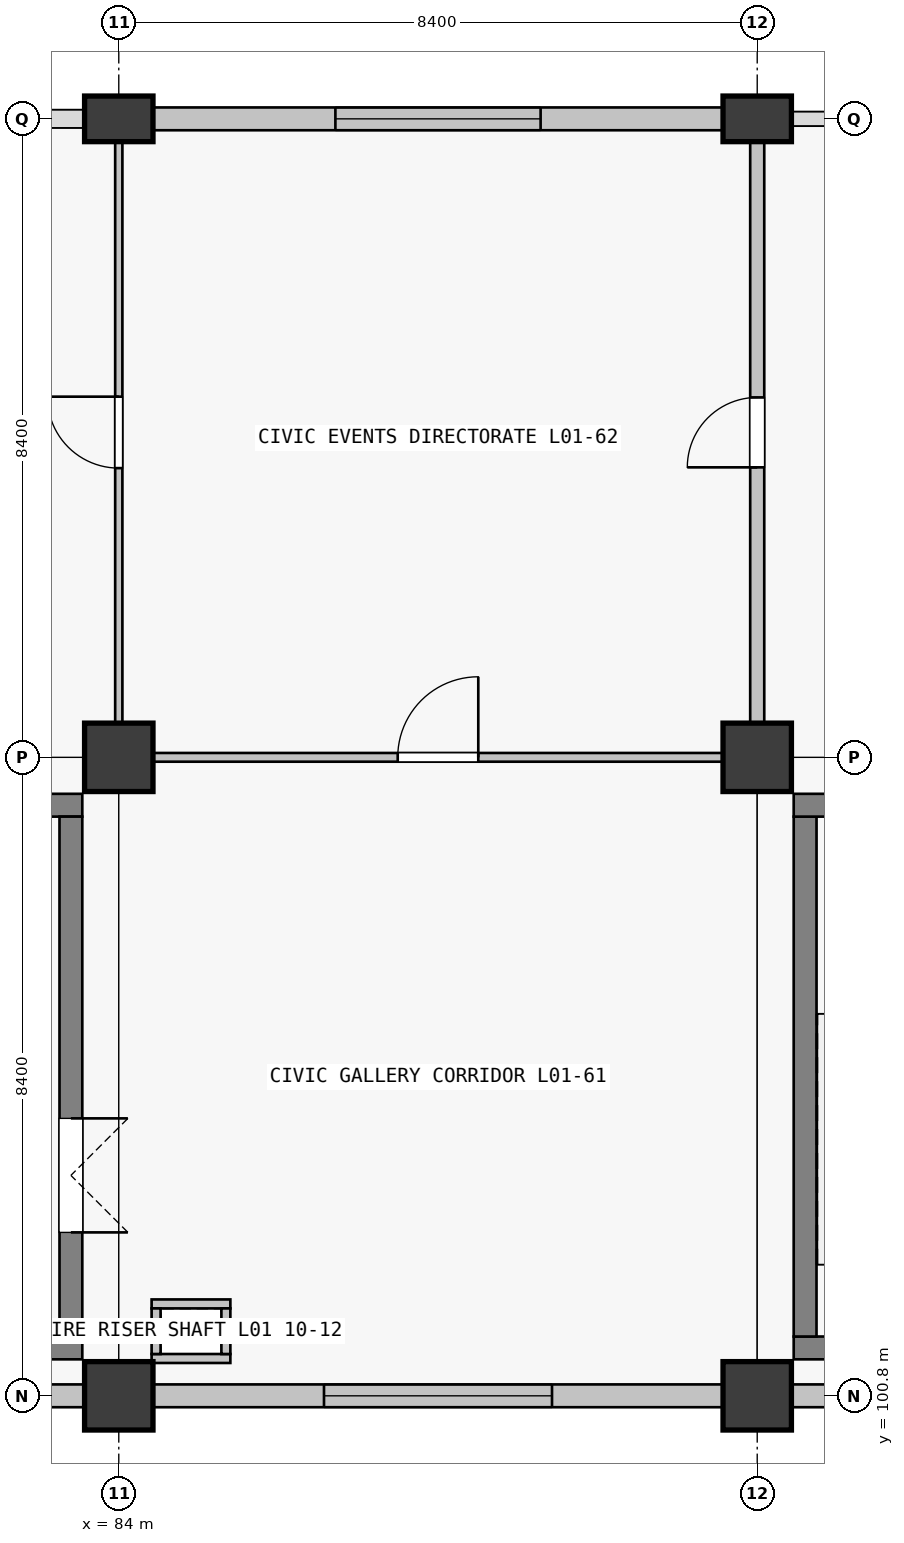
"""IFC4 building model, lengths in metres.
Left out: names, types, materials, properties, quantities, classifications, styles, units other than length and angle.
Written with IfcOpenShell. Run it as: python <this file> out.ifc"""

import sys

from ifc_helpers import new_model, si_unit, direction, frame, frame_2d, origin, origin_2d, place, context, subcontext, project, spatial, rectangle, extrude, element, fill, save


model = new_model("IFC4")
c1 = context("Model", 3, precision=1e-05, world=origin(), true_north=direction((0.0, 1.0)))
c2 = subcontext(c1, "Body", "Model", "MODEL_VIEW")
j1 = project(units=[si_unit("LENGTHUNIT", "METRE"), si_unit("PLANEANGLEUNIT", "RADIAN")], contexts=[c1])
p1 = place(None, origin())
s1 = spatial("IfcSite", under=j1, at=p1, CompositionType="ELEMENT")
p2 = place(p1, origin())
s2 = spatial("IfcBuilding", under=s1, at=p2, CompositionType="ELEMENT")
p3 = place(p2, frame((0.0, 0.0, 5.76)))
s3 = spatial("IfcBuildingStorey", under=s2, at=p3, CompositionType="ELEMENT", Elevation=5.76)
for number, where, z_axis, x_axis in (
    (1, (84.0, 100.8, 0.0), (0.0, 0.0, 1.0), (1.0, 0.0, 0.0)),
    (2, (84.0, 109.2, 0.0), (0.0, 0.0, 1.0), (1.0, 0.0, 0.0)),
):
    element("IfcColumn", number, at=place(p3, frame(where, z_axis=z_axis, x_axis=x_axis)), inside=s3, PredefinedType="COLUMN", context=c2, shape_type="SweptSolid", body=[
        extrude(rectangle(XDim=0.9, YDim=0.9, at=origin_2d()), origin(), (0.0, 0.0, 1.0), 4.5),
    ])
p4 = place(p3, frame((84.0, 117.6, 0.0), z_axis=(0.0, 0.0, 1.0), x_axis=(1.0, 0.0, 0.0)))
e3 = element("IfcColumn", 3, at=p4, inside=s3, PredefinedType="COLUMN", context=c2, shape_type="SweptSolid", body=[
    extrude(rectangle(XDim=0.9, YDim=0.6, at=origin_2d()), origin(), (0.0, 0.0, 1.0), 4.5),
])
for number, where, z_axis, x_axis in (
    (4, (92.4, 100.8, 0.0), (0.0, 0.0, 1.0), (1.0, 0.0, 0.0)),
    (5, (92.4, 109.2, 0.0), (0.0, 0.0, 1.0), (1.0, 0.0, 0.0)),
):
    element("IfcColumn", number, at=place(p3, frame(where, z_axis=z_axis, x_axis=x_axis)), inside=s3, PredefinedType="COLUMN", context=c2, shape_type="SweptSolid", body=[
        extrude(rectangle(XDim=0.9, YDim=0.9, at=origin_2d()), origin(), (0.0, 0.0, 1.0), 4.5),
    ])
p5 = place(p3, frame((92.4, 117.6, 0.0), z_axis=(0.0, 0.0, 1.0), x_axis=(1.0, 0.0, 0.0)))
e6 = element("IfcColumn", 6, at=p5, inside=s3, PredefinedType="COLUMN", context=c2, shape_type="SweptSolid", body=[
    extrude(rectangle(XDim=0.9, YDim=0.6, at=origin_2d()), origin(), (0.0, 0.0, 1.0), 4.5),
])
p6 = place(p3, frame((83.549, 100.8, 0.0), z_axis=(0.0, 0.0, 1.0), x_axis=(-1.0, 0.0, 0.0)))
e7 = element("IfcWall", 7, at=p6, inside=s3, PredefinedType="SOLIDWALL", context=c2, shape_type="SweptSolid", body=[
    extrude(rectangle(XDim=7.498, YDim=0.3, at=frame_2d((3.749, 0.0))), origin(), (0.0, 0.0, 1.0), 3.4),
])
p7 = place(p3, frame((91.949, 100.8, 0.0), z_axis=(0.0, 0.0, 1.0), x_axis=(-1.0, 0.0, 0.0)))
e8 = element("IfcWall", 8, at=p7, inside=s3, PredefinedType="SOLIDWALL", context=c2, shape_type="SweptSolid", body=[
    extrude(rectangle(XDim=7.498, YDim=0.3, at=frame_2d((3.749, 0.0))), origin(), (0.0, 0.0, 1.0), 3.4),
])
p8 = place(p7, frame((2.249, 0.0, 0.9)))
e9 = element("IfcOpeningElement", 9, at=p8, cuts=e8, PredefinedType="OPENING", context=c2, shape_type="SweptSolid", body=[
    extrude(rectangle(XDim=3.0, YDim=1.2, at=frame_2d((1.5, 0.6))), frame((0.0, 0.15, 0.0), z_axis=(0.0, -1.0, 0.0), x_axis=(1.0, 0.0, 0.0)), (0.0, 0.0, 1.0), 0.3),
])
p9 = place(p3, frame((84.451, 117.6, 0.0), z_axis=(0.0, 0.0, 1.0), x_axis=(1.0, 0.0, 0.0)))
e10 = element("IfcWall", 10, at=p9, inside=s3, PredefinedType="SOLIDWALL", context=c2, shape_type="SweptSolid", body=[
    extrude(rectangle(XDim=7.498, YDim=0.3, at=frame_2d((3.749, 0.0))), origin(), (0.0, 0.0, 1.0), 3.4),
])
p10 = place(p9, frame((2.399, 0.0, 0.9)))
e11 = element("IfcOpeningElement", 11, at=p10, cuts=e10, PredefinedType="OPENING", context=c2, shape_type="SweptSolid", body=[
    extrude(rectangle(XDim=2.7, YDim=1.2, at=frame_2d((1.35, 0.6))), frame((0.0, 0.15, 0.0), z_axis=(0.0, -1.0, 0.0), x_axis=(1.0, 0.0, 0.0)), (0.0, 0.0, 1.0), 0.3),
])
p11 = place(p3, frame((100.349, 100.8, 0.0), z_axis=(0.0, 0.0, 1.0), x_axis=(-1.0, 0.0, 0.0)))
e12 = element("IfcWall", 12, at=p11, inside=s3, PredefinedType="SOLIDWALL", context=c2, shape_type="SweptSolid", body=[
    extrude(rectangle(XDim=7.498, YDim=0.3, at=frame_2d((3.749, 0.0))), origin(), (0.0, 0.0, 1.0), 3.4),
])
for number, where, z_axis, x_axis in (
    (13, (83.52, 101.43, 0.0), (0.0, 0.0, 1.0), (-1.0, 0.0, 0.0)),
    (14, (76.08, 108.57, 0.0), (0.0, 0.0, 1.0), (1.0, 0.0, 0.0)),
):
    element("IfcWall", number, at=place(p3, frame(where, z_axis=z_axis, x_axis=x_axis)), inside=s3, PredefinedType="SHEAR", context=c2, shape_type="SweptSolid", body=[
        extrude(rectangle(XDim=7.44, YDim=0.3, at=frame_2d((3.72, 0.0))), origin(), (0.0, 0.0, 1.0), 4.5),
    ])
p12 = place(p3, frame((83.37, 108.42, 0.0), z_axis=(0.0, 0.0, 1.0), x_axis=(0.0, -1.0, 0.0)))
e15 = element("IfcWall", 15, at=p12, inside=s3, PredefinedType="SHEAR", context=c2, shape_type="SweptSolid", body=[
    extrude(rectangle(XDim=6.84, YDim=0.3, at=frame_2d((3.42, 0.0))), origin(), (0.0, 0.0, 1.0), 4.5),
])
p13 = place(p12, frame((3.97, 0.0, 0.0)))
e16 = element("IfcOpeningElement", 16, at=p13, cuts=e15, PredefinedType="OPENING", context=c2, shape_type="SweptSolid", body=[
    extrude(rectangle(XDim=1.5, YDim=2.15, at=frame_2d((0.75, 1.075))), frame((0.0, 0.15, 0.0), z_axis=(0.0, -1.0, 0.0), x_axis=(1.0, 0.0, 0.0)), (0.0, 0.0, 1.0), 0.3),
])
p14 = place(p3, frame((100.32, 101.43, 0.0), z_axis=(0.0, 0.0, 1.0), x_axis=(-1.0, 0.0, 0.0)))
e17 = element("IfcWall", 17, at=p14, inside=s3, PredefinedType="SHEAR", context=c2, shape_type="SweptSolid", body=[
    extrude(rectangle(XDim=7.44, YDim=0.3, at=frame_2d((3.72, 0.0))), origin(), (0.0, 0.0, 1.0), 4.5),
])
p15 = place(p3, frame((93.03, 101.58, 0.0), z_axis=(0.0, 0.0, 1.0), x_axis=(0.0, 1.0, 0.0)))
e18 = element("IfcWall", 18, at=p15, inside=s3, PredefinedType="SHEAR", context=c2, shape_type="SweptSolid", body=[
    extrude(rectangle(XDim=6.84, YDim=0.3, at=frame_2d((3.42, 0.0))), origin(), (0.0, 0.0, 1.0), 4.5),
])
p16 = place(p3, frame((92.88, 108.57, 0.0), z_axis=(0.0, 0.0, 1.0), x_axis=(1.0, 0.0, 0.0)))
e19 = element("IfcWall", 19, at=p16, inside=s3, PredefinedType="SHEAR", context=c2, shape_type="SweptSolid", body=[
    extrude(rectangle(XDim=7.44, YDim=0.3, at=frame_2d((3.72, 0.0))), origin(), (0.0, 0.0, 1.0), 4.5),
])
for number, where, z_axis, x_axis in (
    (20, (84.432, 101.291, 0.0), (0.0, 0.0, 1.0), (1.0, 0.0, 0.0)),
    (21, (84.432, 102.009, 0.0), (0.0, 0.0, 1.0), (1.0, 0.0, 0.0)),
):
    element("IfcWall", number, at=place(p3, frame(where, z_axis=z_axis, x_axis=x_axis)), inside=s3, PredefinedType="PARTITIONING", context=c2, shape_type="SweptSolid", body=[
        extrude(rectangle(XDim=1.036, YDim=0.118, at=frame_2d((0.518, 0.0))), origin(), (0.0, 0.0, 1.0), 3.48),
    ])
for number, where, z_axis, x_axis in (
    (22, (84.491, 101.35, 0.0), (0.0, 0.0, 1.0), (0.0, 1.0, 0.0)),
    (23, (85.409, 101.35, 0.0), (0.0, 0.0, 1.0), (0.0, 1.0, 0.0)),
):
    element("IfcWall", number, at=place(p3, frame(where, z_axis=z_axis, x_axis=x_axis)), inside=s3, PredefinedType="PARTITIONING", context=c2, shape_type="SweptSolid", body=[
        extrude(rectangle(XDim=0.6, YDim=0.118, at=frame_2d((0.3, 0.0))), origin(), (0.0, 0.0, 1.0), 3.48),
    ])
p17 = place(p3, frame((84.452, 109.2, 0.0), z_axis=(0.0, 0.0, 1.0), x_axis=(1.0, 0.0, 0.0)))
e24 = element("IfcWall", 24, at=p17, inside=s3, PredefinedType="PARTITIONING", context=c2, shape_type="SweptSolid", body=[
    extrude(rectangle(XDim=7.496, YDim=0.115, at=frame_2d((3.748, 0.0))), origin(), (0.0, 0.0, 1.0), 2.4),
])
p18 = place(p17, frame((3.218, 0.0, 0.0)))
e25 = element("IfcOpeningElement", 25, at=p18, cuts=e24, PredefinedType="OPENING", context=c2, shape_type="SweptSolid", body=[
    extrude(rectangle(XDim=1.06, YDim=2.22, at=frame_2d((0.53, 1.11))), frame((0.0, 0.058, 0.0), z_axis=(0.0, -1.0, 0.0), x_axis=(1.0, 0.0, 0.0)), (0.0, 0.0, 1.0), 0.115),
])
p19 = place(p3, frame((84.0, 109.652, 0.0), z_axis=(0.0, 0.0, 1.0), x_axis=(0.0, 1.0, 0.0)))
e26 = element("IfcWall", 26, at=p19, inside=s3, PredefinedType="PARTITIONING", context=c2, shape_type="SweptSolid", body=[
    extrude(rectangle(XDim=7.646, YDim=0.095, at=frame_2d((3.823, 0.0))), origin(), (0.0, 0.0, 1.0), 2.4),
])
p20 = place(p19, frame((3.353, 0.0, 0.0)))
e27 = element("IfcOpeningElement", 27, at=p20, cuts=e26, PredefinedType="OPENING", context=c2, shape_type="SweptSolid", body=[
    extrude(rectangle(XDim=0.94, YDim=2.15, at=frame_2d((0.47, 1.075))), frame((0.0, 0.047, 0.0), z_axis=(0.0, -1.0, 0.0), x_axis=(1.0, 0.0, 0.0)), (0.0, 0.0, 1.0), 0.095),
])
p21 = place(p3, frame((92.4, 109.652, 0.0), z_axis=(0.0, 0.0, 1.0), x_axis=(0.0, 1.0, 0.0)))
e28 = element("IfcWall", 28, at=p21, inside=s3, PredefinedType="PARTITIONING", context=c2, shape_type="SweptSolid", body=[
    extrude(rectangle(XDim=7.646, YDim=0.185, at=frame_2d((3.823, 0.0))), origin(), (0.0, 0.0, 1.0), 2.4),
])
p22 = place(p21, frame((3.363, 0.0, 0.0)))
e29 = element("IfcOpeningElement", 29, at=p22, cuts=e28, PredefinedType="OPENING", context=c2, shape_type="SweptSolid", body=[
    extrude(rectangle(XDim=0.92, YDim=2.15, at=frame_2d((0.46, 1.075))), frame((0.0, 0.093, 0.0), z_axis=(0.0, -1.0, 0.0), x_axis=(1.0, 0.0, 0.0)), (0.0, 0.0, 1.0), 0.185),
])
p23 = place(p8, origin())
e30 = element("IfcWindow", 30, at=p23, inside=s3, PartitioningType="SINGLE_PANEL", PredefinedType="WINDOW", context=c2, shape_type="SweptSolid", body=[
    extrude(rectangle(XDim=3.0, YDim=1.2, at=frame_2d((1.5, 0.6))), frame((0.0, 0.03, 0.0), z_axis=(0.0, -1.0, 0.0), x_axis=(1.0, 0.0, 0.0)), (0.0, 0.0, 1.0), 0.06),
])
fill(e9, e30)
p24 = place(p10, origin())
e31 = element("IfcWindow", 31, at=p24, inside=s3, PartitioningType="SINGLE_PANEL", PredefinedType="WINDOW", context=c2, shape_type="SweptSolid", body=[
    extrude(rectangle(XDim=2.7, YDim=1.2, at=frame_2d((1.35, 0.6))), frame((0.0, 0.03, 0.0), z_axis=(0.0, -1.0, 0.0), x_axis=(1.0, 0.0, 0.0)), (0.0, 0.0, 1.0), 0.06),
])
fill(e11, e31)
p25 = place(p13, origin())
e32 = element("IfcDoor", 32, at=p25, inside=s3, OperationType="DOUBLE_DOOR_SINGLE_SWING", PredefinedType="DOOR", context=c2, shape_type="SweptSolid", body=[
    extrude(rectangle(XDim=1.5, YDim=2.15, at=frame_2d((0.75, 1.075))), frame((0.0, 0.025, 0.0), z_axis=(0.0, -1.0, 0.0), x_axis=(1.0, 0.0, 0.0)), (0.0, 0.0, 1.0), 0.05),
])
fill(e16, e32)
p26 = place(p18, origin())
e33 = element("IfcDoor", 33, at=p26, inside=s3, OperationType="SINGLE_SWING_RIGHT", PredefinedType="DOOR", context=c2, shape_type="SweptSolid", body=[
    extrude(rectangle(XDim=1.06, YDim=2.22, at=frame_2d((0.53, 1.11))), frame((0.0, 0.025, 0.0), z_axis=(0.0, -1.0, 0.0), x_axis=(1.0, 0.0, 0.0)), (0.0, 0.0, 1.0), 0.05),
])
fill(e25, e33)
p27 = place(p20, origin())
e34 = element("IfcDoor", 34, at=p27, inside=s3, OperationType="SINGLE_SWING_RIGHT", PredefinedType="DOOR", context=c2, shape_type="SweptSolid", body=[
    extrude(rectangle(XDim=0.94, YDim=2.15, at=frame_2d((0.47, 1.075))), frame((0.0, 0.025, 0.0), z_axis=(0.0, -1.0, 0.0), x_axis=(1.0, 0.0, 0.0)), (0.0, 0.0, 1.0), 0.05),
])
fill(e27, e34)
p28 = place(p22, origin())
e35 = element("IfcDoor", 35, at=p28, inside=s3, OperationType="SINGLE_SWING_LEFT", PredefinedType="DOOR", context=c2, shape_type="SweptSolid", body=[
    extrude(rectangle(XDim=0.92, YDim=2.15, at=frame_2d((0.46, 1.075))), frame((0.0, 0.025, 0.0), z_axis=(0.0, -1.0, 0.0), x_axis=(1.0, 0.0, 0.0)), (0.0, 0.0, 1.0), 0.05),
])
fill(e29, e35)
save(model, sys.argv[1])
